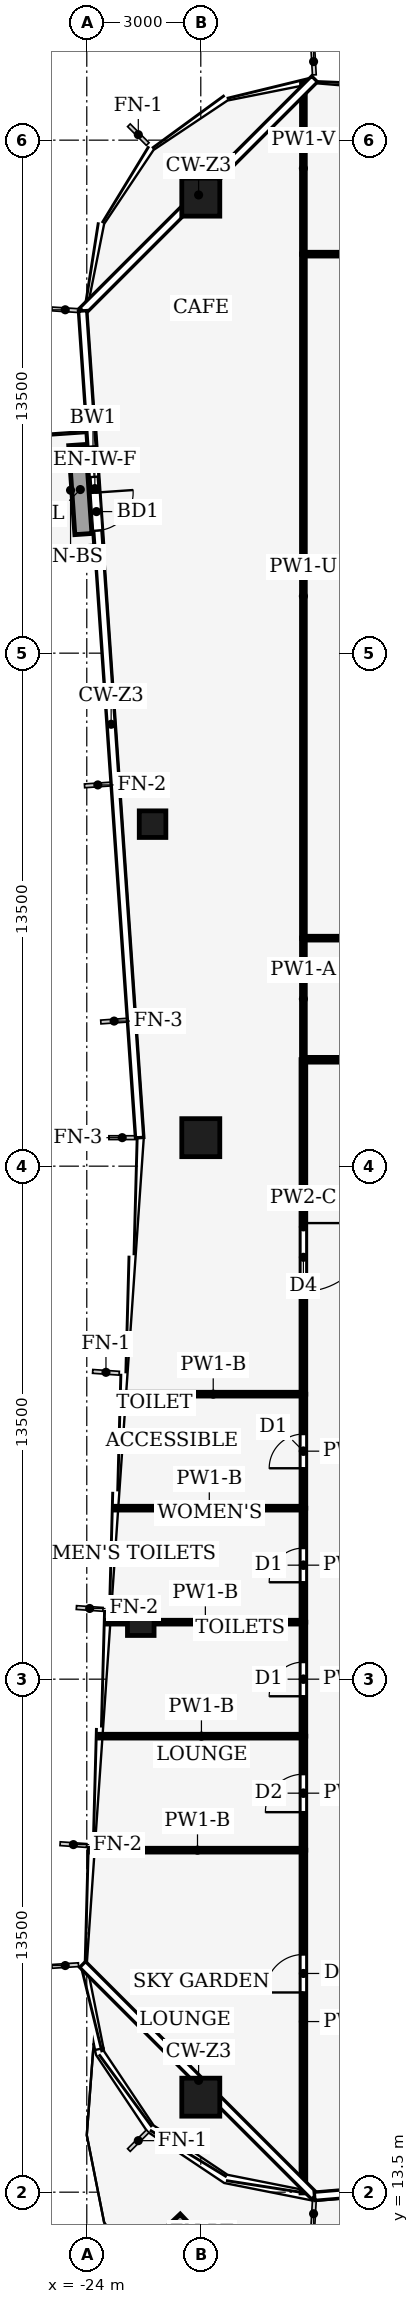
"""IFC4 building model, lengths in metres.
Left out: names, types, materials, properties, quantities, classifications, styles, units other than length and angle.
Written with IfcOpenShell. Run it as: python <this file> out.ifc"""

import sys

from ifc_helpers import new_model, si_unit, direction, frame, frame_2d, origin, origin_2d, place, context, subcontext, project, spatial, rectangle, hollow_rectangle, extrude, element, fill, save


model = new_model("IFC4")
c1 = context("Model", 3, precision=1e-05, world=origin(), true_north=direction((0.0, 1.0)))
c2 = subcontext(c1, "Body", "Model", "MODEL_VIEW")
j1 = project(units=[si_unit("LENGTHUNIT", "METRE"), si_unit("PLANEANGLEUNIT", "RADIAN")], contexts=[c1])
p1 = place(None, origin())
s1 = spatial("IfcSite", under=j1, at=p1, CompositionType="ELEMENT")
p2 = place(p1, origin())
s2 = spatial("IfcBuilding", under=s1, at=p2, CompositionType="ELEMENT")
p3 = place(p2, frame((0.0, 0.0, 177.0)))
s3 = spatial("IfcBuildingStorey", under=s2, at=p3, CompositionType="ELEMENT", Elevation=177.0)
for number, where, z_axis, x_axis in (
    (1, (-21.0, 66.0, 0.0), (0.0, 0.0, 1.0), (1.0, 0.0, 0.0)),
    (2, (-21.0, 16.0, 0.0), (0.0, 0.0, 1.0), (1.0, 0.0, 0.0)),
    (3, (-21.0, 41.25, 0.0), (0.0, 0.0, 1.0), (1.0, 0.0, 0.0)),
):
    element("IfcColumn", number, at=place(p3, frame(where, z_axis=z_axis, x_axis=x_axis)), inside=s3, PredefinedType="COLUMN", context=c2, shape_type="SweptSolid", body=[
        extrude(hollow_rectangle(XDim=1.0, YDim=1.0, WallThickness=0.06, at=origin_2d()), origin(), (0.0, 0.0, 1.0), 5.0),
    ])
for number, where, z_axis, x_axis in (
    (4, (-22.579, 28.5, 0.0), (0.0, 0.0, 1.0), (1.0, 0.0, 0.0)),
    (5, (-22.269, 49.5, 0.0), (0.0, 0.0, 1.0), (1.0, 0.0, 0.0)),
):
    element("IfcColumn", number, at=place(p3, frame(where, z_axis=z_axis, x_axis=x_axis)), inside=s3, PredefinedType="COLUMN", context=c2, shape_type="SweptSolid", body=[
        extrude(hollow_rectangle(XDim=0.7, YDim=0.7, WallThickness=0.03, at=origin_2d()), origin(), (0.0, 0.0, 1.0), 5.0),
    ])
p4 = place(p3, frame((-23.892, 59.853, 0.0), z_axis=(0.0, 0.0, 1.0), x_axis=(0.068788350144, -0.997631276016, 0.0)))
e6 = element("IfcWall", 6, at=p4, inside=s3, PredefinedType="SOLIDWALL", context=c2, shape_type="SweptSolid", body=[
    extrude(rectangle(XDim=3.049, YDim=0.218, at=frame_2d((1.524, 0.0))), origin(), (0.0, 0.0, 1.0), 4.65),
])
p5 = place(p4, frame((1.632, 0.0, 0.0)))
e7 = element("IfcOpeningElement", 7, at=p5, cuts=e6, PredefinedType="OPENING", context=c2, shape_type="SweptSolid", body=[
    extrude(rectangle(XDim=1.0, YDim=2.1, at=frame_2d((0.5, 1.05))), frame((0.0, 0.119, 0.0), z_axis=(0.0, -1.0, 0.0), x_axis=(1.0, 0.0, 0.0)), (0.0, 0.0, 1.0), 0.238),
])
p6 = place(p4, frame((0.416, 0.0, 0.9)))
e8 = element("IfcOpeningElement", 8, at=p6, cuts=e6, PredefinedType="OPENING", context=c2, shape_type="SweptSolid", body=[
    extrude(rectangle(XDim=0.8, YDim=1.2, at=frame_2d((0.4, 0.6))), frame((0.0, 0.119, 0.0), z_axis=(0.0, -1.0, 0.0), x_axis=(1.0, 0.0, 0.0)), (0.0, 0.0, 1.0), 0.238),
])
p7 = place(p3, frame((-24.251, 59.477, 0.0), z_axis=(0.0, 0.0, 1.0), x_axis=(0.068816361971, -0.997629344158, 0.0)))
e9 = element("IfcWall", 9, at=p7, inside=s3, PredefinedType="USERDEFINED", context=c2, shape_type="SweptSolid", body=[
    extrude(rectangle(XDim=2.349, YDim=0.45, at=frame_2d((1.174, 0.0))), origin(), (0.0, 0.0, 1.0), 0.4),
])
p8 = place(p3, frame((-20.081, 10.724, 0.0), z_axis=(0.0, 0.0, 1.0), x_axis=(-0.687257444479, 0.726413935031, 0.0)))
e10 = element("IfcWall", 10, at=p8, inside=s3, PredefinedType="USERDEFINED", context=c2, shape_type="SweptSolid", body=[
    extrude(rectangle(XDim=2.6, YDim=0.9, at=frame_2d((1.3, 0.0))), origin(), (0.0, 0.0, 1.0), 0.5),
])
p9 = place(p3, frame((-18.3, 43.3, 0.0), z_axis=(0.0, 0.0, 1.0), x_axis=(1.0, 0.0, 0.0)))
e11 = element("IfcWall", 11, at=p9, inside=s3, PredefinedType="PARTITIONING", context=c2, shape_type="SweptSolid", body=[
    extrude(rectangle(XDim=12.3, YDim=0.125, at=frame_2d((6.15, 0.0))), origin(), (0.0, 0.0, 1.0), 4.44),
])
p10 = place(p9, frame((5.65, 0.0, 0.0)))
e12 = element("IfcOpeningElement", 12, at=p10, cuts=e11, PredefinedType="OPENING", context=c2, shape_type="SweptSolid", body=[
    extrude(rectangle(XDim=1.0, YDim=2.1, at=frame_2d((0.5, 1.05))), frame((0.0, 0.073, 0.0), z_axis=(0.0, -1.0, 0.0), x_axis=(1.0, 0.0, 0.0)), (0.0, 0.0, 1.0), 0.145),
])
p11 = place(p3, frame((-18.3, 13.48, 0.0), z_axis=(0.0, 0.0, 1.0), x_axis=(0.0, 1.0, 0.0)))
e13 = element("IfcWall", 13, at=p11, inside=s3, PredefinedType="PARTITIONING", context=c2, shape_type="SweptSolid", body=[
    extrude(rectangle(XDim=9.02, YDim=0.125, at=frame_2d((4.51, 0.0))), origin(), (0.0, 0.0, 1.0), 3.93),
])
p12 = place(p11, frame((5.276, 0.0, 0.0)))
e14 = element("IfcOpeningElement", 14, at=p12, cuts=e13, PredefinedType="OPENING", context=c2, shape_type="SweptSolid", body=[
    extrude(rectangle(XDim=1.0, YDim=2.1, at=frame_2d((0.5, 1.05))), frame((0.0, 0.073, 0.0), z_axis=(0.0, -1.0, 0.0), x_axis=(1.0, 0.0, 0.0)), (0.0, 0.0, 1.0), 0.145),
])
p13 = place(p3, frame((-18.3, 22.5, 0.0), z_axis=(0.0, 0.0, 1.0), x_axis=(0.0, 1.0, 0.0)))
e15 = element("IfcWall", 15, at=p13, inside=s3, PredefinedType="PARTITIONING", context=c2, shape_type="SweptSolid", body=[
    extrude(rectangle(XDim=3.0, YDim=0.125, at=frame_2d((1.5, 0.0))), origin(), (0.0, 0.0, 1.0), 4.44),
])
p14 = place(p13, frame((1.0, 0.0, 0.0)))
e16 = element("IfcOpeningElement", 16, at=p14, cuts=e15, PredefinedType="OPENING", context=c2, shape_type="SweptSolid", body=[
    extrude(rectangle(XDim=1.0, YDim=2.1, at=frame_2d((0.5, 1.05))), frame((0.0, 0.073, 0.0), z_axis=(0.0, -1.0, 0.0), x_axis=(1.0, 0.0, 0.0)), (0.0, 0.0, 1.0), 0.145),
])
p15 = place(p3, frame((-18.3, 25.5, 0.0), z_axis=(0.0, 0.0, 1.0), x_axis=(0.0, 1.0, 0.0)))
e17 = element("IfcWall", 17, at=p15, inside=s3, PredefinedType="PARTITIONING", context=c2, shape_type="SweptSolid", body=[
    extrude(rectangle(XDim=3.0, YDim=0.125, at=frame_2d((1.5, 0.0))), origin(), (0.0, 0.0, 1.0), 4.87),
])
p16 = place(p15, frame((1.05, 0.0, 0.0)))
e18 = element("IfcOpeningElement", 18, at=p16, cuts=e17, PredefinedType="OPENING", context=c2, shape_type="SweptSolid", body=[
    extrude(rectangle(XDim=0.9, YDim=2.1, at=frame_2d((0.45, 1.05))), frame((0.0, 0.073, 0.0), z_axis=(0.0, -1.0, 0.0), x_axis=(1.0, 0.0, 0.0)), (0.0, 0.0, 1.0), 0.145),
])
p17 = place(p3, frame((-18.3, 28.5, 0.0), z_axis=(0.0, 0.0, 1.0), x_axis=(0.0, 1.0, 0.0)))
e19 = element("IfcWall", 19, at=p17, inside=s3, PredefinedType="PARTITIONING", context=c2, shape_type="SweptSolid", body=[
    extrude(rectangle(XDim=3.0, YDim=0.125, at=frame_2d((1.5, 0.0))), origin(), (0.0, 0.0, 1.0), 4.87),
])
p18 = place(p17, frame((1.05, 0.0, 0.0)))
e20 = element("IfcOpeningElement", 20, at=p18, cuts=e19, PredefinedType="OPENING", context=c2, shape_type="SweptSolid", body=[
    extrude(rectangle(XDim=0.9, YDim=2.1, at=frame_2d((0.45, 1.05))), frame((0.0, 0.073, 0.0), z_axis=(0.0, -1.0, 0.0), x_axis=(1.0, 0.0, 0.0)), (0.0, 0.0, 1.0), 0.145),
])
p19 = place(p3, frame((-18.3, 31.5, 0.0), z_axis=(0.0, 0.0, 1.0), x_axis=(0.0, 1.0, 0.0)))
e21 = element("IfcWall", 21, at=p19, inside=s3, PredefinedType="PARTITIONING", context=c2, shape_type="SweptSolid", body=[
    extrude(rectangle(XDim=3.0, YDim=0.125, at=frame_2d((1.5, 0.0))), origin(), (0.0, 0.0, 1.0), 4.87),
])
p20 = place(p19, frame((1.05, 0.0, 0.0)))
e22 = element("IfcOpeningElement", 22, at=p20, cuts=e21, PredefinedType="OPENING", context=c2, shape_type="SweptSolid", body=[
    extrude(rectangle(XDim=0.9, YDim=2.1, at=frame_2d((0.45, 1.05))), frame((0.0, 0.073, 0.0), z_axis=(0.0, -1.0, 0.0), x_axis=(1.0, 0.0, 0.0)), (0.0, 0.0, 1.0), 0.145),
])
p21 = place(p3, frame((-18.3, 43.304, 0.0), z_axis=(0.0, 0.0, 1.0), x_axis=(0.0, -1.0, 0.0)))
e23 = element("IfcWall", 23, at=p21, inside=s3, PredefinedType="PARTITIONING", context=c2, shape_type="SweptSolid", body=[
    extrude(rectangle(XDim=8.804, YDim=0.125, at=frame_2d((4.402, 0.0))), origin(), (0.0, 0.0, 1.0), 4.14),
])
p22 = place(p21, frame((4.302, 0.0, 0.0)))
e24 = element("IfcOpeningElement", 24, at=p22, cuts=e23, PredefinedType="OPENING", context=c2, shape_type="SweptSolid", body=[
    extrude(rectangle(XDim=1.8, YDim=2.1, at=frame_2d((0.9, 1.05))), frame((0.0, 0.073, 0.0), z_axis=(0.0, -1.0, 0.0), x_axis=(1.0, 0.0, 0.0)), (0.0, 0.0, 1.0), 0.145),
])
p23 = place(p3, frame((-5.996, 46.5, 0.0), z_axis=(0.0, 0.0, 1.0), x_axis=(-1.0, 0.0, 0.0)))
e25 = element("IfcWall", 25, at=p23, inside=s3, PredefinedType="PARTITIONING", context=c2, shape_type="SweptSolid", body=[
    extrude(rectangle(XDim=12.304, YDim=0.1, at=frame_2d((6.152, 0.0))), origin(), (0.0, 0.0, 1.0), 4.44),
])
p24 = place(p3, frame((-18.3, 46.504, 0.0), z_axis=(0.0, 0.0, 1.0), x_axis=(0.0, -1.0, 0.0)))
e26 = element("IfcWall", 26, at=p24, inside=s3, PredefinedType="PARTITIONING", context=c2, shape_type="SweptSolid", body=[
    extrude(rectangle(XDim=3.208, YDim=0.1, at=frame_2d((1.604, 0.0))), origin(), (0.0, 0.0, 1.0), 4.87),
])
p25 = place(p3, frame((-18.3, 64.5, 0.0), z_axis=(0.0, 0.0, 1.0), x_axis=(1.0, 0.0, 0.0)))
e27 = element("IfcWall", 27, at=p25, inside=s3, PredefinedType="PARTITIONING", context=c2, shape_type="SweptSolid", body=[
    extrude(rectangle(XDim=9.3, YDim=0.1, at=frame_2d((4.65, 0.0))), origin(), (0.0, 0.0, 1.0), 4.24),
])
p26 = place(p25, frame((3.35, 0.0, 0.0)))
e28 = element("IfcOpeningElement", 28, at=p26, cuts=e27, PredefinedType="OPENING", context=c2, shape_type="SweptSolid", body=[
    extrude(rectangle(XDim=1.0, YDim=2.1, at=frame_2d((0.5, 1.05))), frame((0.0, 0.06, 0.0), z_axis=(0.0, -1.0, 0.0), x_axis=(1.0, 0.0, 0.0)), (0.0, 0.0, 1.0), 0.12),
])
p27 = place(p3, frame((-18.3, 64.504, 0.0), z_axis=(0.0, 0.0, 1.0), x_axis=(0.0, -1.0, 0.0)))
e29 = element("IfcWall", 29, at=p27, inside=s3, PredefinedType="PARTITIONING", context=c2, shape_type="SweptSolid", body=[
    extrude(rectangle(XDim=18.008, YDim=0.1, at=frame_2d((9.004, 0.0))), origin(), (0.0, 0.0, 1.0), 4.24),
])
p28 = place(p3, frame((-18.3, 69.02, 0.0), z_axis=(0.0, 0.0, 1.0), x_axis=(0.0, -1.0, 0.0)))
e30 = element("IfcWall", 30, at=p28, inside=s3, PredefinedType="PARTITIONING", context=c2, shape_type="SweptSolid", body=[
    extrude(rectangle(XDim=4.524, YDim=0.1, at=frame_2d((2.262, 0.0))), origin(), (0.0, 0.0, 1.0), 3.93),
])
p29 = place(p3, frame((-18.3, 22.5, 0.0), z_axis=(0.0, 0.0, 1.0), x_axis=(-1.0, 0.0, 0.0)))
e31 = element("IfcWall", 31, at=p29, inside=s3, PredefinedType="PARTITIONING", context=c2, shape_type="SweptSolid", body=[
    extrude(rectangle(XDim=5.573, YDim=0.1, at=frame_2d((2.787, 0.0))), origin(), (0.0, 0.0, 1.0), 4.04),
])
p30 = place(p3, frame((-18.3, 25.5, 0.0), z_axis=(0.0, 0.0, 1.0), x_axis=(-1.0, 0.0, 0.0)))
e32 = element("IfcWall", 32, at=p30, inside=s3, PredefinedType="PARTITIONING", context=c2, shape_type="SweptSolid", body=[
    extrude(rectangle(XDim=5.366, YDim=0.1, at=frame_2d((2.683, 0.0))), origin(), (0.0, 0.0, 1.0), 4.04),
])
p31 = place(p3, frame((-18.3, 28.5, 0.0), z_axis=(0.0, 0.0, 1.0), x_axis=(-1.0, 0.0, 0.0)))
e33 = element("IfcWall", 33, at=p31, inside=s3, PredefinedType="PARTITIONING", context=c2, shape_type="SweptSolid", body=[
    extrude(rectangle(XDim=5.159, YDim=0.1, at=frame_2d((2.58, 0.0))), origin(), (0.0, 0.0, 1.0), 4.04),
])
p32 = place(p3, frame((-18.3, 31.5, 0.0), z_axis=(0.0, 0.0, 1.0), x_axis=(-1.0, 0.0, 0.0)))
e34 = element("IfcWall", 34, at=p32, inside=s3, PredefinedType="PARTITIONING", context=c2, shape_type="SweptSolid", body=[
    extrude(rectangle(XDim=4.952, YDim=0.1, at=frame_2d((2.476, 0.0))), origin(), (0.0, 0.0, 1.0), 4.04),
])
p33 = place(p3, frame((-18.3, 34.5, 0.0), z_axis=(0.0, 0.0, 1.0), x_axis=(-1.0, 0.0, 0.0)))
e35 = element("IfcWall", 35, at=p33, inside=s3, PredefinedType="PARTITIONING", context=c2, shape_type="SweptSolid", body=[
    extrude(rectangle(XDim=4.745, YDim=0.1, at=frame_2d((2.373, 0.0))), origin(), (0.0, 0.0, 1.0), 4.04),
])
p34 = place(p5, origin())
e36 = element("IfcDoor", 36, at=p34, inside=s3, OperationType="SINGLE_SWING_RIGHT", PredefinedType="DOOR", context=c2, shape_type="SweptSolid", body=[
    extrude(rectangle(XDim=1.0, YDim=2.1, at=frame_2d((0.5, 1.05))), frame((0.0, 0.025, 0.0), z_axis=(0.0, -1.0, 0.0), x_axis=(1.0, 0.0, 0.0)), (0.0, 0.0, 1.0), 0.05),
])
fill(e7, e36)
p35 = place(p6, origin())
e37 = element("IfcWindow", 37, at=p35, inside=s3, PartitioningType="SINGLE_PANEL", PredefinedType="WINDOW", context=c2, shape_type="SweptSolid", body=[
    extrude(rectangle(XDim=0.8, YDim=1.2, at=frame_2d((0.4, 0.6))), frame((0.0, 0.03, 0.0), z_axis=(0.0, -1.0, 0.0), x_axis=(1.0, 0.0, 0.0)), (0.0, 0.0, 1.0), 0.06),
])
fill(e8, e37)
p36 = place(p12, origin())
e38 = element("IfcDoor", 38, at=p36, inside=s3, OperationType="SINGLE_SWING_RIGHT", PredefinedType="DOOR", context=c2, shape_type="SweptSolid", body=[
    extrude(rectangle(XDim=1.0, YDim=2.1, at=frame_2d((0.5, 1.05))), frame((0.0, 0.025, 0.0), z_axis=(0.0, -1.0, 0.0), x_axis=(1.0, 0.0, 0.0)), (0.0, 0.0, 1.0), 0.05),
])
fill(e14, e38)
p37 = place(p14, origin())
e39 = element("IfcDoor", 39, at=p37, inside=s3, OperationType="SINGLE_SWING_RIGHT", PredefinedType="DOOR", context=c2, shape_type="SweptSolid", body=[
    extrude(rectangle(XDim=1.0, YDim=2.1, at=frame_2d((0.5, 1.05))), frame((0.0, 0.025, 0.0), z_axis=(0.0, -1.0, 0.0), x_axis=(1.0, 0.0, 0.0)), (0.0, 0.0, 1.0), 0.05),
])
fill(e16, e39)
p38 = place(p16, origin())
e40 = element("IfcDoor", 40, at=p38, inside=s3, OperationType="SINGLE_SWING_LEFT", PredefinedType="DOOR", context=c2, shape_type="SweptSolid", body=[
    extrude(rectangle(XDim=0.9, YDim=2.1, at=frame_2d((0.45, 1.05))), frame((0.0, 0.025, 0.0), z_axis=(0.0, -1.0, 0.0), x_axis=(1.0, 0.0, 0.0)), (0.0, 0.0, 1.0), 0.05),
])
fill(e18, e40)
p39 = place(p18, origin())
e41 = element("IfcDoor", 41, at=p39, inside=s3, OperationType="SINGLE_SWING_RIGHT", PredefinedType="DOOR", context=c2, shape_type="SweptSolid", body=[
    extrude(rectangle(XDim=0.9, YDim=2.1, at=frame_2d((0.45, 1.05))), frame((0.0, 0.025, 0.0), z_axis=(0.0, -1.0, 0.0), x_axis=(1.0, 0.0, 0.0)), (0.0, 0.0, 1.0), 0.05),
])
fill(e20, e41)
p40 = place(p20, origin())
e42 = element("IfcDoor", 42, at=p40, inside=s3, OperationType="SINGLE_SWING_LEFT", PredefinedType="DOOR", context=c2, shape_type="SweptSolid", body=[
    extrude(rectangle(XDim=0.9, YDim=2.1, at=frame_2d((0.45, 1.05))), frame((0.0, 0.025, 0.0), z_axis=(0.0, -1.0, 0.0), x_axis=(1.0, 0.0, 0.0)), (0.0, 0.0, 1.0), 0.05),
])
fill(e22, e42)
p41 = place(p22, origin())
e43 = element("IfcDoor", 43, at=p41, inside=s3, OperationType="DOUBLE_DOOR_SINGLE_SWING", PredefinedType="DOOR", context=c2, shape_type="SweptSolid", body=[
    extrude(rectangle(XDim=1.8, YDim=2.1, at=frame_2d((0.9, 1.05))), frame((0.0, 0.025, 0.0), z_axis=(0.0, -1.0, 0.0), x_axis=(1.0, 0.0, 0.0)), (0.0, 0.0, 1.0), 0.05),
])
fill(e24, e43)
save(model, sys.argv[1])
